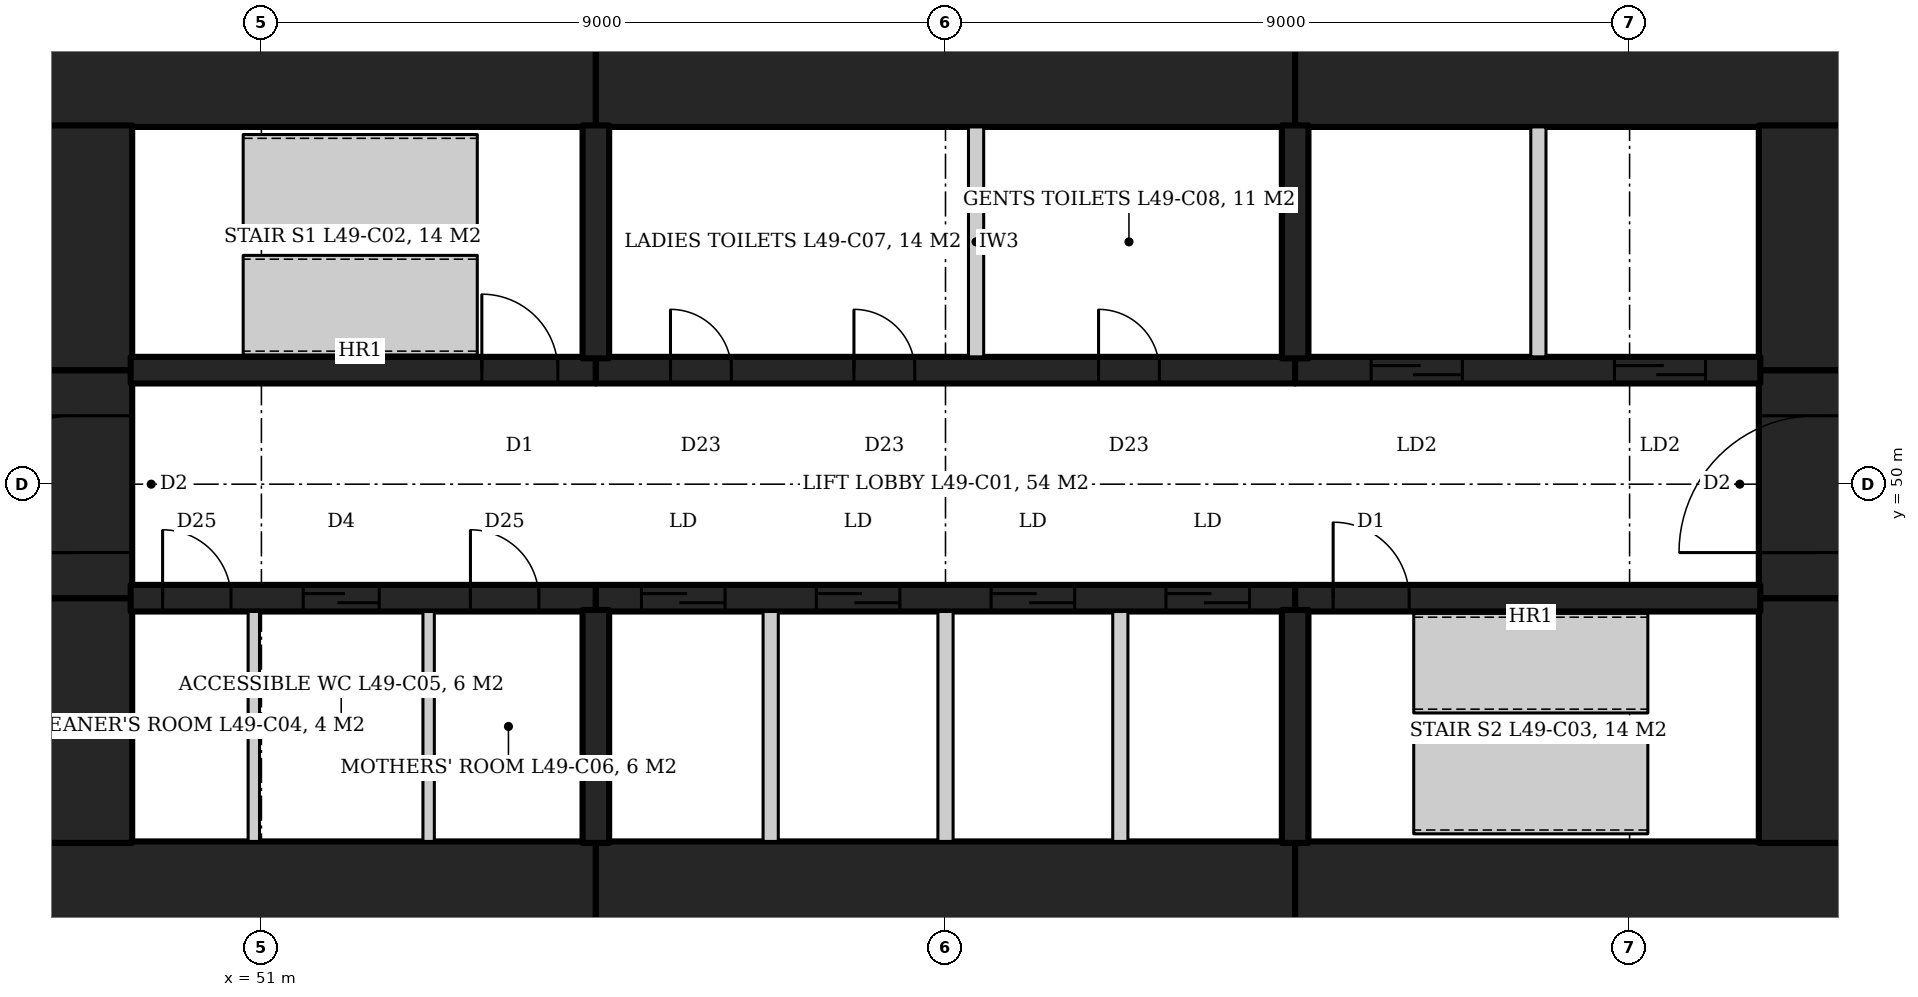
"""IFC4 building model, lengths in metres.
Left out: names, types, materials, properties, quantities, classifications, styles, units other than length and angle.
Written with IfcOpenShell. Run it as: python <this file> out.ifc"""

import sys

from ifc_helpers import new_model, si_unit, direction, frame, frame_2d, origin, place, context, subcontext, project, spatial, rectangle, extrude, element, fill, save


model = new_model("IFC4")
c1 = context("Model", 3, precision=1e-05, world=origin(), true_north=direction((0.0, 1.0)))
c2 = subcontext(c1, "Body", "Model", "MODEL_VIEW")
j1 = project(units=[si_unit("LENGTHUNIT", "METRE"), si_unit("PLANEANGLEUNIT", "RADIAN")], contexts=[c1])
p1 = place(None, origin())
s1 = spatial("IfcSite", under=j1, at=p1, CompositionType="ELEMENT")
p2 = place(p1, origin())
s2 = spatial("IfcBuilding", under=s1, at=p2, CompositionType="ELEMENT")
p3 = place(p2, frame((0.0, 0.0, 215.0)))
s3 = spatial("IfcBuildingStorey", under=s2, at=p3, CompositionType="ELEMENT", Elevation=215.0)
p4 = place(p3, frame((47.8, 55.45, 0.0), z_axis=(0.0, 0.0, 1.0), x_axis=(1.0, 0.0, 0.0)))
e1 = element("IfcWall", 1, at=p4, inside=s3, PredefinedType="SHEAR", context=c2, shape_type="SweptSolid", body=[
    extrude(rectangle(XDim=7.6, YDim=1.5, at=frame_2d((3.8, 0.0))), origin(), (0.0, 0.0, 1.0), 4.2),
])
p5 = place(p3, frame((55.4, 55.45, 0.0), z_axis=(0.0, 0.0, 1.0), x_axis=(1.0, 0.0, 0.0)))
e2 = element("IfcWall", 2, at=p5, inside=s3, PredefinedType="SHEAR", context=c2, shape_type="SweptSolid", body=[
    extrude(rectangle(XDim=9.2, YDim=1.5, at=frame_2d((4.6, 0.0))), origin(), (0.0, 0.0, 1.0), 4.2),
])
for number, where, z_axis, x_axis in (
    (3, (64.6, 55.45, 0.0), (0.0, 0.0, 1.0), (1.0, 0.0, 0.0)),
    (4, (47.8, 44.55, 0.0), (0.0, 0.0, 1.0), (1.0, 0.0, 0.0)),
):
    element("IfcWall", number, at=place(p3, frame(where, z_axis=z_axis, x_axis=x_axis)), inside=s3, PredefinedType="SHEAR", context=c2, shape_type="SweptSolid", body=[
        extrude(rectangle(XDim=7.6, YDim=1.5, at=frame_2d((3.8, 0.0))), origin(), (0.0, 0.0, 1.0), 4.2),
    ])
p6 = place(p3, frame((55.4, 44.55, 0.0), z_axis=(0.0, 0.0, 1.0), x_axis=(1.0, 0.0, 0.0)))
e5 = element("IfcWall", 5, at=p6, inside=s3, PredefinedType="SHEAR", context=c2, shape_type="SweptSolid", body=[
    extrude(rectangle(XDim=9.2, YDim=1.5, at=frame_2d((4.6, 0.0))), origin(), (0.0, 0.0, 1.0), 4.2),
])
p7 = place(p3, frame((64.6, 44.55, 0.0), z_axis=(0.0, 0.0, 1.0), x_axis=(1.0, 0.0, 0.0)))
e6 = element("IfcWall", 6, at=p7, inside=s3, PredefinedType="SHEAR", context=c2, shape_type="SweptSolid", body=[
    extrude(rectangle(XDim=7.6, YDim=1.5, at=frame_2d((3.8, 0.0))), origin(), (0.0, 0.0, 1.0), 4.2),
])
p8 = place(p3, frame((71.45, 45.28, 0.0), z_axis=(0.0, 0.0, 1.0), x_axis=(0.0, 1.0, 0.0)))
e7 = element("IfcWall", 7, at=p8, inside=s3, PredefinedType="SHEAR", context=c2, shape_type="SweptSolid", body=[
    extrude(rectangle(XDim=3.22, YDim=1.5, at=frame_2d((1.61, 0.0))), origin(), (0.0, 0.0, 1.0), 4.2),
])
p9 = place(p3, frame((71.45, 48.5, 0.0), z_axis=(0.0, 0.0, 1.0), x_axis=(0.0, 1.0, 0.0)))
e8 = element("IfcWall", 8, at=p9, inside=s3, PredefinedType="SHEAR", context=c2, shape_type="SweptSolid", body=[
    extrude(rectangle(XDim=3.0, YDim=1.5, at=frame_2d((1.5, 0.0))), origin(), (0.0, 0.0, 1.0), 4.2),
])
p10 = place(p9, frame((0.6, 0.0, 0.0)))
e9 = element("IfcOpeningElement", 9, at=p10, cuts=e8, PredefinedType="OPENING", context=c2, shape_type="SweptSolid", body=[
    extrude(rectangle(XDim=1.8, YDim=2.1, at=frame_2d((0.9, 1.05))), frame((0.0, 0.76, 0.0), z_axis=(0.0, -1.0, 0.0), x_axis=(1.0, 0.0, 0.0)), (0.0, 0.0, 1.0), 1.52),
])
for number, where, z_axis, x_axis in (
    (10, (71.45, 51.5, 0.0), (0.0, 0.0, 1.0), (0.0, 1.0, 0.0)),
    (11, (48.55, 45.28, 0.0), (0.0, 0.0, 1.0), (0.0, 1.0, 0.0)),
):
    element("IfcWall", number, at=place(p3, frame(where, z_axis=z_axis, x_axis=x_axis)), inside=s3, PredefinedType="SHEAR", context=c2, shape_type="SweptSolid", body=[
        extrude(rectangle(XDim=3.22, YDim=1.5, at=frame_2d((1.61, 0.0))), origin(), (0.0, 0.0, 1.0), 4.2),
    ])
p11 = place(p3, frame((48.55, 48.5, 0.0), z_axis=(0.0, 0.0, 1.0), x_axis=(0.0, 1.0, 0.0)))
e12 = element("IfcWall", 12, at=p11, inside=s3, PredefinedType="SHEAR", context=c2, shape_type="SweptSolid", body=[
    extrude(rectangle(XDim=3.0, YDim=1.5, at=frame_2d((1.5, 0.0))), origin(), (0.0, 0.0, 1.0), 4.2),
])
p12 = place(p11, frame((0.6, 0.0, 0.0)))
e13 = element("IfcOpeningElement", 13, at=p12, cuts=e12, PredefinedType="OPENING", context=c2, shape_type="SweptSolid", body=[
    extrude(rectangle(XDim=1.8, YDim=2.1, at=frame_2d((0.9, 1.05))), frame((0.0, 0.76, 0.0), z_axis=(0.0, -1.0, 0.0), x_axis=(1.0, 0.0, 0.0)), (0.0, 0.0, 1.0), 1.52),
])
p13 = place(p3, frame((48.55, 51.5, 0.0), z_axis=(0.0, 0.0, 1.0), x_axis=(0.0, 1.0, 0.0)))
e14 = element("IfcWall", 14, at=p13, inside=s3, PredefinedType="SHEAR", context=c2, shape_type="SweptSolid", body=[
    extrude(rectangle(XDim=3.22, YDim=1.5, at=frame_2d((1.61, 0.0))), origin(), (0.0, 0.0, 1.0), 4.2),
])
p14 = place(p3, frame((49.28, 51.5, 0.0), z_axis=(0.0, 0.0, 1.0), x_axis=(1.0, 0.0, 0.0)))
e15 = element("IfcWall", 15, at=p14, inside=s3, PredefinedType="SHEAR", context=c2, shape_type="SweptSolid", body=[
    extrude(rectangle(XDim=6.12, YDim=0.35, at=frame_2d((3.06, 0.0))), origin(), (0.0, 0.0, 1.0), 4.2),
])
p15 = place(p14, frame((4.62, 0.0, 0.0)))
e16 = element("IfcOpeningElement", 16, at=p15, cuts=e15, PredefinedType="OPENING", context=c2, shape_type="SweptSolid", body=[
    extrude(rectangle(XDim=1.0, YDim=2.1, at=frame_2d((0.5, 1.05))), frame((0.0, 0.185, 0.0), z_axis=(0.0, -1.0, 0.0), x_axis=(1.0, 0.0, 0.0)), (0.0, 0.0, 1.0), 0.37),
])
p16 = place(p3, frame((55.4, 51.5, 0.0), z_axis=(0.0, 0.0, 1.0), x_axis=(1.0, 0.0, 0.0)))
e17 = element("IfcWall", 17, at=p16, inside=s3, PredefinedType="SHEAR", context=c2, shape_type="SweptSolid", body=[
    extrude(rectangle(XDim=9.2, YDim=0.35, at=frame_2d((4.6, 0.0))), origin(), (0.0, 0.0, 1.0), 4.2),
])
p17 = place(p16, frame((0.982, 0.0, 0.0)))
e18 = element("IfcOpeningElement", 18, at=p17, cuts=e17, PredefinedType="OPENING", context=c2, shape_type="SweptSolid", body=[
    extrude(rectangle(XDim=0.8, YDim=2.1, at=frame_2d((0.4, 1.05))), frame((0.0, 0.185, 0.0), z_axis=(0.0, -1.0, 0.0), x_axis=(1.0, 0.0, 0.0)), (0.0, 0.0, 1.0), 0.37),
])
p18 = place(p16, frame((3.396, 0.0, 0.0)))
e19 = element("IfcOpeningElement", 19, at=p18, cuts=e17, PredefinedType="OPENING", context=c2, shape_type="SweptSolid", body=[
    extrude(rectangle(XDim=0.8, YDim=2.1, at=frame_2d((0.4, 1.05))), frame((0.0, 0.185, 0.0), z_axis=(0.0, -1.0, 0.0), x_axis=(1.0, 0.0, 0.0)), (0.0, 0.0, 1.0), 0.37),
])
p19 = place(p16, frame((6.614, 0.0, 0.0)))
e20 = element("IfcOpeningElement", 20, at=p19, cuts=e17, PredefinedType="OPENING", context=c2, shape_type="SweptSolid", body=[
    extrude(rectangle(XDim=0.8, YDim=2.1, at=frame_2d((0.4, 1.05))), frame((0.0, 0.185, 0.0), z_axis=(0.0, -1.0, 0.0), x_axis=(1.0, 0.0, 0.0)), (0.0, 0.0, 1.0), 0.37),
])
p20 = place(p3, frame((64.6, 51.5, 0.0), z_axis=(0.0, 0.0, 1.0), x_axis=(1.0, 0.0, 0.0)))
e21 = element("IfcWall", 21, at=p20, inside=s3, PredefinedType="SHEAR", context=c2, shape_type="SweptSolid", body=[
    extrude(rectangle(XDim=6.12, YDim=0.35, at=frame_2d((3.06, 0.0))), origin(), (0.0, 0.0, 1.0), 4.2),
])
p21 = place(p20, frame((1.0, 0.0, 0.0)))
e22 = element("IfcOpeningElement", 22, at=p21, cuts=e21, PredefinedType="OPENING", context=c2, shape_type="SweptSolid", body=[
    extrude(rectangle(XDim=1.2, YDim=2.1, at=frame_2d((0.6, 1.05))), frame((0.0, 0.185, 0.0), z_axis=(0.0, -1.0, 0.0), x_axis=(1.0, 0.0, 0.0)), (0.0, 0.0, 1.0), 0.37),
])
p22 = place(p20, frame((4.2, 0.0, 0.0)))
e23 = element("IfcOpeningElement", 23, at=p22, cuts=e21, PredefinedType="OPENING", context=c2, shape_type="SweptSolid", body=[
    extrude(rectangle(XDim=1.2, YDim=2.1, at=frame_2d((0.6, 1.05))), frame((0.0, 0.185, 0.0), z_axis=(0.0, -1.0, 0.0), x_axis=(1.0, 0.0, 0.0)), (0.0, 0.0, 1.0), 0.37),
])
p23 = place(p3, frame((49.28, 48.5, 0.0), z_axis=(0.0, 0.0, 1.0), x_axis=(1.0, 0.0, 0.0)))
e24 = element("IfcWall", 24, at=p23, inside=s3, PredefinedType="SHEAR", context=c2, shape_type="SweptSolid", body=[
    extrude(rectangle(XDim=6.12, YDim=0.35, at=frame_2d((3.06, 0.0))), origin(), (0.0, 0.0, 1.0), 4.2),
])
p24 = place(p23, frame((0.42, 0.0, 0.0)))
e25 = element("IfcOpeningElement", 25, at=p24, cuts=e24, PredefinedType="OPENING", context=c2, shape_type="SweptSolid", body=[
    extrude(rectangle(XDim=0.9, YDim=2.1, at=frame_2d((0.45, 1.05))), frame((0.0, 0.185, 0.0), z_axis=(0.0, -1.0, 0.0), x_axis=(1.0, 0.0, 0.0)), (0.0, 0.0, 1.0), 0.37),
])
p25 = place(p23, frame((2.27, 0.0, 0.0)))
e26 = element("IfcOpeningElement", 26, at=p25, cuts=e24, PredefinedType="OPENING", context=c2, shape_type="SweptSolid", body=[
    extrude(rectangle(XDim=1.0, YDim=2.1, at=frame_2d((0.5, 1.05))), frame((0.0, 0.185, 0.0), z_axis=(0.0, -1.0, 0.0), x_axis=(1.0, 0.0, 0.0)), (0.0, 0.0, 1.0), 0.37),
])
p26 = place(p23, frame((4.47, 0.0, 0.0)))
e27 = element("IfcOpeningElement", 27, at=p26, cuts=e24, PredefinedType="OPENING", context=c2, shape_type="SweptSolid", body=[
    extrude(rectangle(XDim=0.9, YDim=2.1, at=frame_2d((0.45, 1.05))), frame((0.0, 0.185, 0.0), z_axis=(0.0, -1.0, 0.0), x_axis=(1.0, 0.0, 0.0)), (0.0, 0.0, 1.0), 0.37),
])
p27 = place(p3, frame((55.4, 48.5, 0.0), z_axis=(0.0, 0.0, 1.0), x_axis=(1.0, 0.0, 0.0)))
e28 = element("IfcWall", 28, at=p27, inside=s3, PredefinedType="SHEAR", context=c2, shape_type="SweptSolid", body=[
    extrude(rectangle(XDim=9.2, YDim=0.35, at=frame_2d((4.6, 0.0))), origin(), (0.0, 0.0, 1.0), 4.2),
])
p28 = place(p27, frame((0.6, 0.0, 0.0)))
e29 = element("IfcOpeningElement", 29, at=p28, cuts=e28, PredefinedType="OPENING", context=c2, shape_type="SweptSolid", body=[
    extrude(rectangle(XDim=1.1, YDim=2.1, at=frame_2d((0.55, 1.05))), frame((0.0, 0.185, 0.0), z_axis=(0.0, -1.0, 0.0), x_axis=(1.0, 0.0, 0.0)), (0.0, 0.0, 1.0), 0.37),
])
p29 = place(p27, frame((2.9, 0.0, 0.0)))
e30 = element("IfcOpeningElement", 30, at=p29, cuts=e28, PredefinedType="OPENING", context=c2, shape_type="SweptSolid", body=[
    extrude(rectangle(XDim=1.1, YDim=2.1, at=frame_2d((0.55, 1.05))), frame((0.0, 0.185, 0.0), z_axis=(0.0, -1.0, 0.0), x_axis=(1.0, 0.0, 0.0)), (0.0, 0.0, 1.0), 0.37),
])
p30 = place(p27, frame((5.2, 0.0, 0.0)))
e31 = element("IfcOpeningElement", 31, at=p30, cuts=e28, PredefinedType="OPENING", context=c2, shape_type="SweptSolid", body=[
    extrude(rectangle(XDim=1.1, YDim=2.1, at=frame_2d((0.55, 1.05))), frame((0.0, 0.185, 0.0), z_axis=(0.0, -1.0, 0.0), x_axis=(1.0, 0.0, 0.0)), (0.0, 0.0, 1.0), 0.37),
])
p31 = place(p27, frame((7.5, 0.0, 0.0)))
e32 = element("IfcOpeningElement", 32, at=p31, cuts=e28, PredefinedType="OPENING", context=c2, shape_type="SweptSolid", body=[
    extrude(rectangle(XDim=1.1, YDim=2.1, at=frame_2d((0.55, 1.05))), frame((0.0, 0.185, 0.0), z_axis=(0.0, -1.0, 0.0), x_axis=(1.0, 0.0, 0.0)), (0.0, 0.0, 1.0), 0.37),
])
p32 = place(p3, frame((64.6, 48.5, 0.0), z_axis=(0.0, 0.0, 1.0), x_axis=(1.0, 0.0, 0.0)))
e33 = element("IfcWall", 33, at=p32, inside=s3, PredefinedType="SHEAR", context=c2, shape_type="SweptSolid", body=[
    extrude(rectangle(XDim=6.12, YDim=0.35, at=frame_2d((3.06, 0.0))), origin(), (0.0, 0.0, 1.0), 4.2),
])
p33 = place(p32, frame((0.5, 0.0, 0.0)))
e34 = element("IfcOpeningElement", 34, at=p33, cuts=e33, PredefinedType="OPENING", context=c2, shape_type="SweptSolid", body=[
    extrude(rectangle(XDim=1.0, YDim=2.1, at=frame_2d((0.5, 1.05))), frame((0.0, 0.185, 0.0), z_axis=(0.0, -1.0, 0.0), x_axis=(1.0, 0.0, 0.0)), (0.0, 0.0, 1.0), 0.37),
])
for number, where, z_axis, x_axis in (
    (35, (55.4, 51.655, 0.0), (0.0, 0.0, 1.0), (0.0, 1.0, 0.0)),
    (36, (64.6, 51.655, 0.0), (0.0, 0.0, 1.0), (0.0, 1.0, 0.0)),
    (37, (55.4, 48.345, 0.0), (0.0, 0.0, 1.0), (0.0, -1.0, 0.0)),
    (38, (64.6, 48.345, 0.0), (0.0, 0.0, 1.0), (0.0, -1.0, 0.0)),
):
    element("IfcWall", number, at=place(p3, frame(where, z_axis=z_axis, x_axis=x_axis)), inside=s3, PredefinedType="SHEAR", context=c2, shape_type="SweptSolid", body=[
        extrude(rectangle(XDim=3.065, YDim=0.35, at=frame_2d((1.532, 0.0))), origin(), (0.0, 0.0, 1.0), 4.2),
    ])
for number, where, z_axis, x_axis in (
    (39, (57.7, 45.3, 0.0), (0.0, 0.0, 1.0), (0.0, 1.0, 0.0)),
    (40, (60.0, 45.3, 0.0), (0.0, 0.0, 1.0), (0.0, 1.0, 0.0)),
    (41, (62.3, 45.3, 0.0), (0.0, 0.0, 1.0), (0.0, 1.0, 0.0)),
    (42, (67.8, 51.675, 0.0), (0.0, 0.0, 1.0), (0.0, 1.0, 0.0)),
):
    element("IfcWall", number, at=place(p3, frame(where, z_axis=z_axis, x_axis=x_axis)), inside=s3, PredefinedType="PARTITIONING", context=c2, shape_type="SweptSolid", body=[
        extrude(rectangle(XDim=3.025, YDim=0.2, at=frame_2d((1.512, 0.0))), origin(), (0.0, 0.0, 1.0), 4.2),
    ])
for number, where, z_axis, x_axis in (
    (43, (50.9, 45.3, 0.0), (0.0, 0.0, 1.0), (0.0, 1.0, 0.0)),
    (44, (53.2, 45.3, 0.0), (0.0, 0.0, 1.0), (0.0, 1.0, 0.0)),
):
    element("IfcWall", number, at=place(p3, frame(where, z_axis=z_axis, x_axis=x_axis)), inside=s3, PredefinedType="PARTITIONING", context=c2, shape_type="SweptSolid", body=[
        extrude(rectangle(XDim=3.025, YDim=0.15, at=frame_2d((1.512, 0.0))), origin(), (0.0, 0.0, 1.0), 4.04),
    ])
p34 = place(p3, frame((60.402, 51.675, 0.0), z_axis=(0.0, 0.0, 1.0), x_axis=(0.0, 1.0, 0.0)))
e45 = element("IfcWall", 45, at=p34, inside=s3, PredefinedType="PARTITIONING", context=c2, shape_type="SweptSolid", body=[
    extrude(rectangle(XDim=3.025, YDim=0.2, at=frame_2d((1.512, 0.0))), origin(), (0.0, 0.0, 1.0), 4.04),
])
p35 = place(p15, origin())
e46 = element("IfcDoor", 46, at=p35, inside=s3, OperationType="SINGLE_SWING_LEFT", PredefinedType="DOOR", context=c2, shape_type="SweptSolid", body=[
    extrude(rectangle(XDim=1.0, YDim=2.1, at=frame_2d((0.5, 1.05))), frame((0.0, 0.025, 0.0), z_axis=(0.0, -1.0, 0.0), x_axis=(1.0, 0.0, 0.0)), (0.0, 0.0, 1.0), 0.05),
])
fill(e16, e46)
p36 = place(p33, origin())
e47 = element("IfcDoor", 47, at=p36, inside=s3, OperationType="SINGLE_SWING_LEFT", PredefinedType="DOOR", context=c2, shape_type="SweptSolid", body=[
    extrude(rectangle(XDim=1.0, YDim=2.1, at=frame_2d((0.5, 1.05))), frame((0.0, 0.025, 0.0), z_axis=(0.0, -1.0, 0.0), x_axis=(1.0, 0.0, 0.0)), (0.0, 0.0, 1.0), 0.05),
])
fill(e34, e47)
p37 = place(p21, origin())
e48 = element("IfcDoor", 48, at=p37, inside=s3, OperationType="SLIDING_TO_LEFT", PredefinedType="DOOR", context=c2, shape_type="SweptSolid", body=[
    extrude(rectangle(XDim=1.2, YDim=2.1, at=frame_2d((0.6, 1.05))), frame((0.0, 0.025, 0.0), z_axis=(0.0, -1.0, 0.0), x_axis=(1.0, 0.0, 0.0)), (0.0, 0.0, 1.0), 0.05),
])
fill(e22, e48)
p38 = place(p22, origin())
e49 = element("IfcDoor", 49, at=p38, inside=s3, OperationType="SLIDING_TO_LEFT", PredefinedType="DOOR", context=c2, shape_type="SweptSolid", body=[
    extrude(rectangle(XDim=1.2, YDim=2.1, at=frame_2d((0.6, 1.05))), frame((0.0, 0.025, 0.0), z_axis=(0.0, -1.0, 0.0), x_axis=(1.0, 0.0, 0.0)), (0.0, 0.0, 1.0), 0.05),
])
fill(e23, e49)
p39 = place(p28, origin())
e50 = element("IfcDoor", 50, at=p39, inside=s3, OperationType="SLIDING_TO_LEFT", PredefinedType="DOOR", context=c2, shape_type="SweptSolid", body=[
    extrude(rectangle(XDim=1.1, YDim=2.1, at=frame_2d((0.55, 1.05))), frame((0.0, 0.025, 0.0), z_axis=(0.0, -1.0, 0.0), x_axis=(1.0, 0.0, 0.0)), (0.0, 0.0, 1.0), 0.05),
])
fill(e29, e50)
p40 = place(p29, origin())
e51 = element("IfcDoor", 51, at=p40, inside=s3, OperationType="SLIDING_TO_LEFT", PredefinedType="DOOR", context=c2, shape_type="SweptSolid", body=[
    extrude(rectangle(XDim=1.1, YDim=2.1, at=frame_2d((0.55, 1.05))), frame((0.0, 0.025, 0.0), z_axis=(0.0, -1.0, 0.0), x_axis=(1.0, 0.0, 0.0)), (0.0, 0.0, 1.0), 0.05),
])
fill(e30, e51)
p41 = place(p30, origin())
e52 = element("IfcDoor", 52, at=p41, inside=s3, OperationType="SLIDING_TO_LEFT", PredefinedType="DOOR", context=c2, shape_type="SweptSolid", body=[
    extrude(rectangle(XDim=1.1, YDim=2.1, at=frame_2d((0.55, 1.05))), frame((0.0, 0.025, 0.0), z_axis=(0.0, -1.0, 0.0), x_axis=(1.0, 0.0, 0.0)), (0.0, 0.0, 1.0), 0.05),
])
fill(e31, e52)
p42 = place(p31, origin())
e53 = element("IfcDoor", 53, at=p42, inside=s3, OperationType="SLIDING_TO_LEFT", PredefinedType="DOOR", context=c2, shape_type="SweptSolid", body=[
    extrude(rectangle(XDim=1.1, YDim=2.1, at=frame_2d((0.55, 1.05))), frame((0.0, 0.025, 0.0), z_axis=(0.0, -1.0, 0.0), x_axis=(1.0, 0.0, 0.0)), (0.0, 0.0, 1.0), 0.05),
])
fill(e32, e53)
p43 = place(p24, origin())
e54 = element("IfcDoor", 54, at=p43, inside=s3, OperationType="SINGLE_SWING_RIGHT", PredefinedType="DOOR", context=c2, shape_type="SweptSolid", body=[
    extrude(rectangle(XDim=0.9, YDim=2.1, at=frame_2d((0.45, 1.05))), frame((0.0, 0.025, 0.0), z_axis=(0.0, -1.0, 0.0), x_axis=(1.0, 0.0, 0.0)), (0.0, 0.0, 1.0), 0.05),
])
fill(e25, e54)
p44 = place(p25, origin())
e55 = element("IfcDoor", 55, at=p44, inside=s3, OperationType="SLIDING_TO_LEFT", PredefinedType="DOOR", context=c2, shape_type="SweptSolid", body=[
    extrude(rectangle(XDim=1.0, YDim=2.1, at=frame_2d((0.5, 1.05))), frame((0.0, 0.025, 0.0), z_axis=(0.0, -1.0, 0.0), x_axis=(1.0, 0.0, 0.0)), (0.0, 0.0, 1.0), 0.05),
])
fill(e26, e55)
p45 = place(p26, origin())
e56 = element("IfcDoor", 56, at=p45, inside=s3, OperationType="SINGLE_SWING_RIGHT", PredefinedType="DOOR", context=c2, shape_type="SweptSolid", body=[
    extrude(rectangle(XDim=0.9, YDim=2.1, at=frame_2d((0.45, 1.05))), frame((0.0, 0.025, 0.0), z_axis=(0.0, -1.0, 0.0), x_axis=(1.0, 0.0, 0.0)), (0.0, 0.0, 1.0), 0.05),
])
fill(e27, e56)
p46 = place(p10, origin())
e57 = element("IfcDoor", 57, at=p46, inside=s3, OperationType="DOUBLE_DOOR_DOUBLE_SWING", PredefinedType="DOOR", context=c2, shape_type="SweptSolid", body=[
    extrude(rectangle(XDim=1.8, YDim=2.1, at=frame_2d((0.9, 1.05))), frame((0.0, 0.025, 0.0), z_axis=(0.0, -1.0, 0.0), x_axis=(1.0, 0.0, 0.0)), (0.0, 0.0, 1.0), 0.05),
])
fill(e9, e57)
p47 = place(p12, origin())
e58 = element("IfcDoor", 58, at=p47, inside=s3, OperationType="DOUBLE_DOOR_DOUBLE_SWING", PredefinedType="DOOR", context=c2, shape_type="SweptSolid", body=[
    extrude(rectangle(XDim=1.8, YDim=2.1, at=frame_2d((0.9, 1.05))), frame((0.0, 0.025, 0.0), z_axis=(0.0, -1.0, 0.0), x_axis=(1.0, 0.0, 0.0)), (0.0, 0.0, 1.0), 0.05),
])
fill(e13, e58)
p48 = place(p17, origin())
e59 = element("IfcDoor", 59, at=p48, inside=s3, OperationType="SINGLE_SWING_LEFT", PredefinedType="DOOR", context=c2, shape_type="SweptSolid", body=[
    extrude(rectangle(XDim=0.8, YDim=2.1, at=frame_2d((0.4, 1.05))), frame((0.0, 0.025, 0.0), z_axis=(0.0, -1.0, 0.0), x_axis=(1.0, 0.0, 0.0)), (0.0, 0.0, 1.0), 0.05),
])
fill(e18, e59)
p49 = place(p18, origin())
e60 = element("IfcDoor", 60, at=p49, inside=s3, OperationType="SINGLE_SWING_LEFT", PredefinedType="DOOR", context=c2, shape_type="SweptSolid", body=[
    extrude(rectangle(XDim=0.8, YDim=2.1, at=frame_2d((0.4, 1.05))), frame((0.0, 0.025, 0.0), z_axis=(0.0, -1.0, 0.0), x_axis=(1.0, 0.0, 0.0)), (0.0, 0.0, 1.0), 0.05),
])
fill(e19, e60)
p50 = place(p19, origin())
e61 = element("IfcDoor", 61, at=p50, inside=s3, OperationType="SINGLE_SWING_LEFT", PredefinedType="DOOR", context=c2, shape_type="SweptSolid", body=[
    extrude(rectangle(XDim=0.8, YDim=2.1, at=frame_2d((0.4, 1.05))), frame((0.0, 0.025, 0.0), z_axis=(0.0, -1.0, 0.0), x_axis=(1.0, 0.0, 0.0)), (0.0, 0.0, 1.0), 0.05),
])
fill(e20, e61)
save(model, sys.argv[1])
